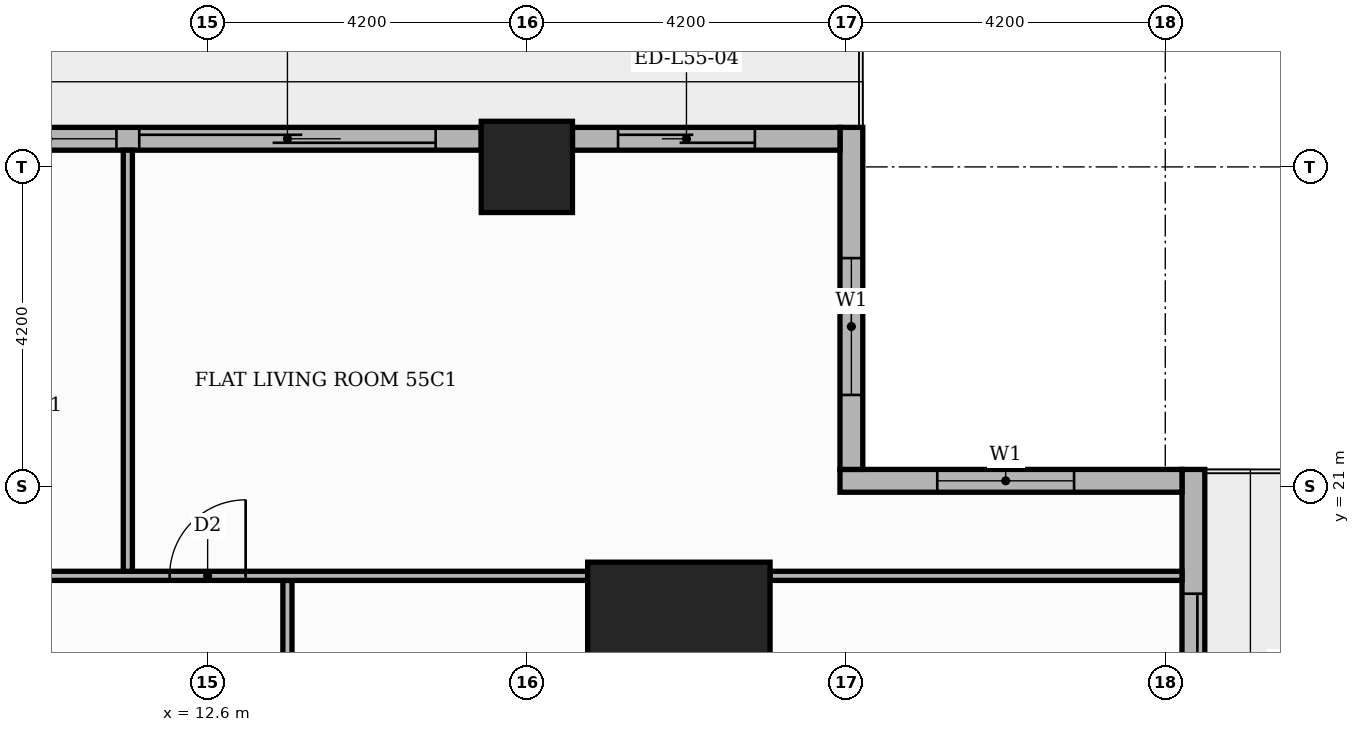
"""IFC4 building model, lengths in metres.
Left out: names, types, materials, properties, quantities, classifications, styles, units other than length and angle.
Written with IfcOpenShell. Run it as: python <this file> out.ifc"""

import sys

from ifc_helpers import new_model, si_unit, direction, frame, frame_2d, origin, origin_2d, place, context, subcontext, project, spatial, rectangle, extrude, element, fill, save


model = new_model("IFC4")
c1 = context("Model", 3, precision=1e-05, world=origin(), true_north=direction((0.0, 1.0)))
c2 = subcontext(c1, "Body", "Model", "MODEL_VIEW")
j1 = project(units=[si_unit("LENGTHUNIT", "METRE"), si_unit("PLANEANGLEUNIT", "RADIAN")], contexts=[c1])
p1 = place(None, origin())
s1 = spatial("IfcSite", under=j1, at=p1, CompositionType="ELEMENT")
p2 = place(p1, origin())
s2 = spatial("IfcBuilding", under=s1, at=p2, CompositionType="ELEMENT")
p3 = place(p2, frame((0.0, 0.0, 231.3)))
s3 = spatial("IfcBuildingStorey", under=s2, at=p3, CompositionType="ELEMENT", Elevation=231.3)
p4 = place(p3, frame((18.8, 18.8, 0.0), z_axis=(0.0, 0.0, 1.0), x_axis=(1.0, 0.0, 0.0)))
e1 = element("IfcColumn", 1, at=p4, inside=s3, PredefinedType="COLUMN", context=c2, shape_type="SweptSolid", body=[
    extrude(rectangle(XDim=2.4, YDim=2.4, at=origin_2d()), origin(), (0.0, 0.0, 1.0), 3.9),
])
p5 = place(p3, frame((16.8, 25.2, 0.0), z_axis=(0.0, 0.0, 1.0), x_axis=(1.0, 0.0, 0.0)))
e2 = element("IfcColumn", 2, at=p5, inside=s3, PredefinedType="COLUMN", context=c2, shape_type="SweptSolid", body=[
    extrude(rectangle(XDim=1.2, YDim=1.2, at=origin_2d()), origin(), (0.0, 0.0, 1.0), 3.9),
])
p6 = place(p3, frame((25.57, 17.4, 0.0), z_axis=(0.0, 0.0, 1.0), x_axis=(0.0, 1.0, 0.0)))
e3 = element("IfcWall", 3, at=p6, inside=s3, PredefinedType="STANDARD", context=c2, shape_type="SweptSolid", body=[
    extrude(rectangle(XDim=3.82, YDim=0.3, at=frame_2d((1.91, 0.0))), origin(), (0.0, 0.0, 1.0), 3.4),
])
p7 = place(p6, frame((0.385, 0.0, 0.0)))
e4 = element("IfcOpeningElement", 4, at=p7, cuts=e3, PredefinedType="OPENING", context=c2, shape_type="SweptSolid", body=[
    extrude(rectangle(XDim=1.8, YDim=2.4, at=frame_2d((0.9, 1.2))), frame((0.0, 0.16, 0.0), z_axis=(0.0, -1.0, 0.0), x_axis=(1.0, 0.0, 0.0)), (0.0, 0.0, 1.0), 0.32),
])
p8 = place(p3, frame((25.42, 21.07, 0.0), z_axis=(0.0, 0.0, 1.0), x_axis=(-1.0, 0.0, 0.0)))
e5 = element("IfcWall", 5, at=p8, inside=s3, PredefinedType="STANDARD", context=c2, shape_type="SweptSolid", body=[
    extrude(rectangle(XDim=4.5, YDim=0.3, at=frame_2d((2.25, 0.0))), origin(), (0.0, 0.0, 1.0), 3.4),
])
p9 = place(p8, frame((1.42, 0.0, 0.9)))
e6 = element("IfcOpeningElement", 6, at=p9, cuts=e5, PredefinedType="OPENING", context=c2, shape_type="SweptSolid", body=[
    extrude(rectangle(XDim=1.8, YDim=2.1, at=frame_2d((0.9, 1.05))), frame((0.0, 0.16, 0.0), z_axis=(0.0, -1.0, 0.0), x_axis=(1.0, 0.0, 0.0)), (0.0, 0.0, 1.0), 0.32),
])
p10 = place(p3, frame((21.07, 21.22, 0.0), z_axis=(0.0, 0.0, 1.0), x_axis=(0.0, 1.0, 0.0)))
e7 = element("IfcWall", 7, at=p10, inside=s3, PredefinedType="STANDARD", context=c2, shape_type="SweptSolid", body=[
    extrude(rectangle(XDim=4.5, YDim=0.3, at=frame_2d((2.25, 0.0))), origin(), (0.0, 0.0, 1.0), 3.4),
])
p11 = place(p10, frame((0.98, 0.0, 0.9)))
e8 = element("IfcOpeningElement", 8, at=p11, cuts=e7, PredefinedType="OPENING", context=c2, shape_type="SweptSolid", body=[
    extrude(rectangle(XDim=1.8, YDim=2.1, at=frame_2d((0.9, 1.05))), frame((0.0, 0.16, 0.0), z_axis=(0.0, -1.0, 0.0), x_axis=(1.0, 0.0, 0.0)), (0.0, 0.0, 1.0), 0.32),
])
p12 = place(p3, frame((20.92, 25.57, 0.0), z_axis=(0.0, 0.0, 1.0), x_axis=(-1.0, 0.0, 0.0)))
e9 = element("IfcWall", 9, at=p12, inside=s3, PredefinedType="STANDARD", context=c2, shape_type="SweptSolid", body=[
    extrude(rectangle(XDim=3.52, YDim=0.3, at=frame_2d((1.76, 0.0))), origin(), (0.0, 0.0, 1.0), 3.4),
])
p13 = place(p12, frame((1.12, 0.0, 0.0)))
e10 = element("IfcOpeningElement", 10, at=p13, cuts=e9, PredefinedType="OPENING", context=c2, shape_type="SweptSolid", body=[
    extrude(rectangle(XDim=1.8, YDim=2.4, at=frame_2d((0.9, 1.2))), frame((0.0, 0.16, 0.0), z_axis=(0.0, -1.0, 0.0), x_axis=(1.0, 0.0, 0.0)), (0.0, 0.0, 1.0), 0.32),
])
p14 = place(p3, frame((16.2, 25.57, 0.0), z_axis=(0.0, 0.0, 1.0), x_axis=(-1.0, 0.0, 0.0)))
e11 = element("IfcWall", 11, at=p14, inside=s3, PredefinedType="STANDARD", context=c2, shape_type="SweptSolid", body=[
    extrude(rectangle(XDim=7.2, YDim=0.3, at=frame_2d((3.6, 0.0))), origin(), (0.0, 0.0, 1.0), 3.4),
])
p15 = place(p14, frame((0.6, 0.0, 0.0)))
e12 = element("IfcOpeningElement", 12, at=p15, cuts=e11, PredefinedType="OPENING", context=c2, shape_type="SweptSolid", body=[
    extrude(rectangle(XDim=3.9, YDim=2.4, at=frame_2d((1.95, 1.2))), frame((0.0, 0.16, 0.0), z_axis=(0.0, -1.0, 0.0), x_axis=(1.0, 0.0, 0.0)), (0.0, 0.0, 1.0), 0.32),
])
p16 = place(p14, frame((4.8, 0.0, 0.9)))
e13 = element("IfcOpeningElement", 13, at=p16, cuts=e11, PredefinedType="OPENING", context=c2, shape_type="SweptSolid", body=[
    extrude(rectangle(XDim=1.8, YDim=2.1, at=frame_2d((0.9, 1.05))), frame((0.0, 0.16, 0.0), z_axis=(0.0, -1.0, 0.0), x_axis=(1.0, 0.0, 0.0)), (0.0, 0.0, 1.0), 0.32),
])
p17 = place(p3, frame((13.65, 13.75, 0.0), z_axis=(0.0, 0.0, 1.0), x_axis=(0.0, 1.0, 0.0)))
e14 = element("IfcWall", 14, at=p17, inside=s3, PredefinedType="PARTITIONING", context=c2, shape_type="SweptSolid", body=[
    extrude(rectangle(XDim=6.01, YDim=0.12, at=frame_2d((3.005, 0.0))), origin(), (0.0, 0.0, 1.0), 3.4),
])
p18 = place(p17, frame((2.535, 0.0, 0.0)))
e15 = element("IfcOpeningElement", 15, at=p18, cuts=e14, PredefinedType="OPENING", context=c2, shape_type="SweptSolid", body=[
    extrude(rectangle(XDim=0.9, YDim=2.1, at=frame_2d((0.45, 1.05))), frame((0.0, 0.07, 0.0), z_axis=(0.0, -1.0, 0.0), x_axis=(1.0, 0.0, 0.0)), (0.0, 0.0, 1.0), 0.14),
])
p19 = place(p3, frame((-13.55, 19.82, 0.0), z_axis=(0.0, 0.0, 1.0), x_axis=(1.0, 0.0, 0.0)))
e16 = element("IfcWall", 16, at=p19, inside=s3, PredefinedType="PARTITIONING", context=c2, shape_type="SweptSolid", body=[
    extrude(rectangle(XDim=31.15, YDim=0.12, at=frame_2d((15.575, 0.0))), origin(), (0.0, 0.0, 1.0), 3.4),
])
p20 = place(p19, frame((25.65, 0.0, 0.0)))
e17 = element("IfcOpeningElement", 17, at=p20, cuts=e16, PredefinedType="OPENING", context=c2, shape_type="SweptSolid", body=[
    extrude(rectangle(XDim=1.0, YDim=2.1, at=frame_2d((0.5, 1.05))), frame((0.0, 0.07, 0.0), z_axis=(0.0, -1.0, 0.0), x_axis=(1.0, 0.0, 0.0)), (0.0, 0.0, 1.0), 0.14),
])
p21 = place(p19, frame((22.55, 0.0, 0.0)))
e18 = element("IfcOpeningElement", 18, at=p21, cuts=e16, PredefinedType="OPENING", context=c2, shape_type="SweptSolid", body=[
    extrude(rectangle(XDim=0.9, YDim=2.1, at=frame_2d((0.45, 1.05))), frame((0.0, 0.07, 0.0), z_axis=(0.0, -1.0, 0.0), x_axis=(1.0, 0.0, 0.0)), (0.0, 0.0, 1.0), 0.14),
])
p22 = place(p19, frame((18.35, 0.0, 0.0)))
e19 = element("IfcOpeningElement", 19, at=p22, cuts=e16, PredefinedType="OPENING", context=c2, shape_type="SweptSolid", body=[
    extrude(rectangle(XDim=0.9, YDim=2.1, at=frame_2d((0.45, 1.05))), frame((0.0, 0.07, 0.0), z_axis=(0.0, -1.0, 0.0), x_axis=(1.0, 0.0, 0.0)), (0.0, 0.0, 1.0), 0.14),
])
p23 = place(p19, frame((9.95, 0.0, 0.0)))
e20 = element("IfcOpeningElement", 20, at=p23, cuts=e16, PredefinedType="OPENING", context=c2, shape_type="SweptSolid", body=[
    extrude(rectangle(XDim=0.9, YDim=2.1, at=frame_2d((0.45, 1.05))), frame((0.0, 0.07, 0.0), z_axis=(0.0, -1.0, 0.0), x_axis=(1.0, 0.0, 0.0)), (0.0, 0.0, 1.0), 0.14),
])
p24 = place(p19, frame((3.65, 0.0, 0.0)))
e21 = element("IfcOpeningElement", 21, at=p24, cuts=e16, PredefinedType="OPENING", context=c2, shape_type="SweptSolid", body=[
    extrude(rectangle(XDim=0.9, YDim=2.1, at=frame_2d((0.45, 1.05))), frame((0.0, 0.07, 0.0), z_axis=(0.0, -1.0, 0.0), x_axis=(1.0, 0.0, 0.0)), (0.0, 0.0, 1.0), 0.14),
])
p25 = place(p3, frame((20.0, 19.82, 0.0), z_axis=(0.0, 0.0, 1.0), x_axis=(1.0, 0.0, 0.0)))
e22 = element("IfcWall", 22, at=p25, inside=s3, PredefinedType="PARTITIONING", context=c2, shape_type="SweptSolid", body=[
    extrude(rectangle(XDim=5.42, YDim=0.12, at=frame_2d((2.71, 0.0))), origin(), (0.0, 0.0, 1.0), 3.4),
])
p26 = place(p3, frame((11.55, 19.88, 0.0), z_axis=(0.0, 0.0, 1.0), x_axis=(0.0, 1.0, 0.0)))
e23 = element("IfcWall", 23, at=p26, inside=s3, PredefinedType="PARTITIONING", context=c2, shape_type="SweptSolid", body=[
    extrude(rectangle(XDim=5.54, YDim=0.12, at=frame_2d((2.77, 0.0))), origin(), (0.0, 0.0, 1.0), 3.4),
])
p27 = place(p7, origin())
e24 = element("IfcDoor", 24, at=p27, inside=s3, OperationType="SLIDING_TO_LEFT", PredefinedType="DOOR", context=c2, shape_type="SweptSolid", body=[
    extrude(rectangle(XDim=1.8, YDim=2.4, at=frame_2d((0.9, 1.2))), frame((0.0, 0.025, 0.0), z_axis=(0.0, -1.0, 0.0), x_axis=(1.0, 0.0, 0.0)), (0.0, 0.0, 1.0), 0.05),
])
fill(e4, e24)
p28 = place(p9, origin())
e25 = element("IfcWindow", 25, at=p28, inside=s3, PartitioningType="SINGLE_PANEL", PredefinedType="WINDOW", context=c2, shape_type="SweptSolid", body=[
    extrude(rectangle(XDim=1.8, YDim=2.1, at=frame_2d((0.9, 1.05))), frame((0.0, 0.03, 0.0), z_axis=(0.0, -1.0, 0.0), x_axis=(1.0, 0.0, 0.0)), (0.0, 0.0, 1.0), 0.06),
])
fill(e6, e25)
p29 = place(p11, origin())
e26 = element("IfcWindow", 26, at=p29, inside=s3, PartitioningType="SINGLE_PANEL", PredefinedType="WINDOW", context=c2, shape_type="SweptSolid", body=[
    extrude(rectangle(XDim=1.8, YDim=2.1, at=frame_2d((0.9, 1.05))), frame((0.0, 0.03, 0.0), z_axis=(0.0, -1.0, 0.0), x_axis=(1.0, 0.0, 0.0)), (0.0, 0.0, 1.0), 0.06),
])
fill(e8, e26)
p30 = place(p13, origin())
e27 = element("IfcDoor", 27, at=p30, inside=s3, OperationType="SLIDING_TO_RIGHT", PredefinedType="DOOR", context=c2, shape_type="SweptSolid", body=[
    extrude(rectangle(XDim=1.8, YDim=2.4, at=frame_2d((0.9, 1.2))), frame((0.0, 0.025, 0.0), z_axis=(0.0, -1.0, 0.0), x_axis=(1.0, 0.0, 0.0)), (0.0, 0.0, 1.0), 0.05),
])
fill(e10, e27)
p31 = place(p15, origin())
e28 = element("IfcDoor", 28, at=p31, inside=s3, OperationType="SLIDING_TO_LEFT", PredefinedType="DOOR", context=c2, shape_type="SweptSolid", body=[
    extrude(rectangle(XDim=3.9, YDim=2.4, at=frame_2d((1.95, 1.2))), frame((0.0, 0.025, 0.0), z_axis=(0.0, -1.0, 0.0), x_axis=(1.0, 0.0, 0.0)), (0.0, 0.0, 1.0), 0.05),
])
fill(e12, e28)
p32 = place(p16, origin())
e29 = element("IfcWindow", 29, at=p32, inside=s3, PartitioningType="SINGLE_PANEL", PredefinedType="WINDOW", context=c2, shape_type="SweptSolid", body=[
    extrude(rectangle(XDim=1.8, YDim=2.1, at=frame_2d((0.9, 1.05))), frame((0.0, 0.03, 0.0), z_axis=(0.0, -1.0, 0.0), x_axis=(1.0, 0.0, 0.0)), (0.0, 0.0, 1.0), 0.06),
])
fill(e13, e29)
p33 = place(p20, origin())
e30 = element("IfcDoor", 30, at=p33, inside=s3, OperationType="SINGLE_SWING_RIGHT", PredefinedType="DOOR", context=c2, shape_type="SweptSolid", body=[
    extrude(rectangle(XDim=1.0, YDim=2.1, at=frame_2d((0.5, 1.05))), frame((0.0, 0.025, 0.0), z_axis=(0.0, -1.0, 0.0), x_axis=(1.0, 0.0, 0.0)), (0.0, 0.0, 1.0), 0.05),
])
fill(e17, e30)
save(model, sys.argv[1])
